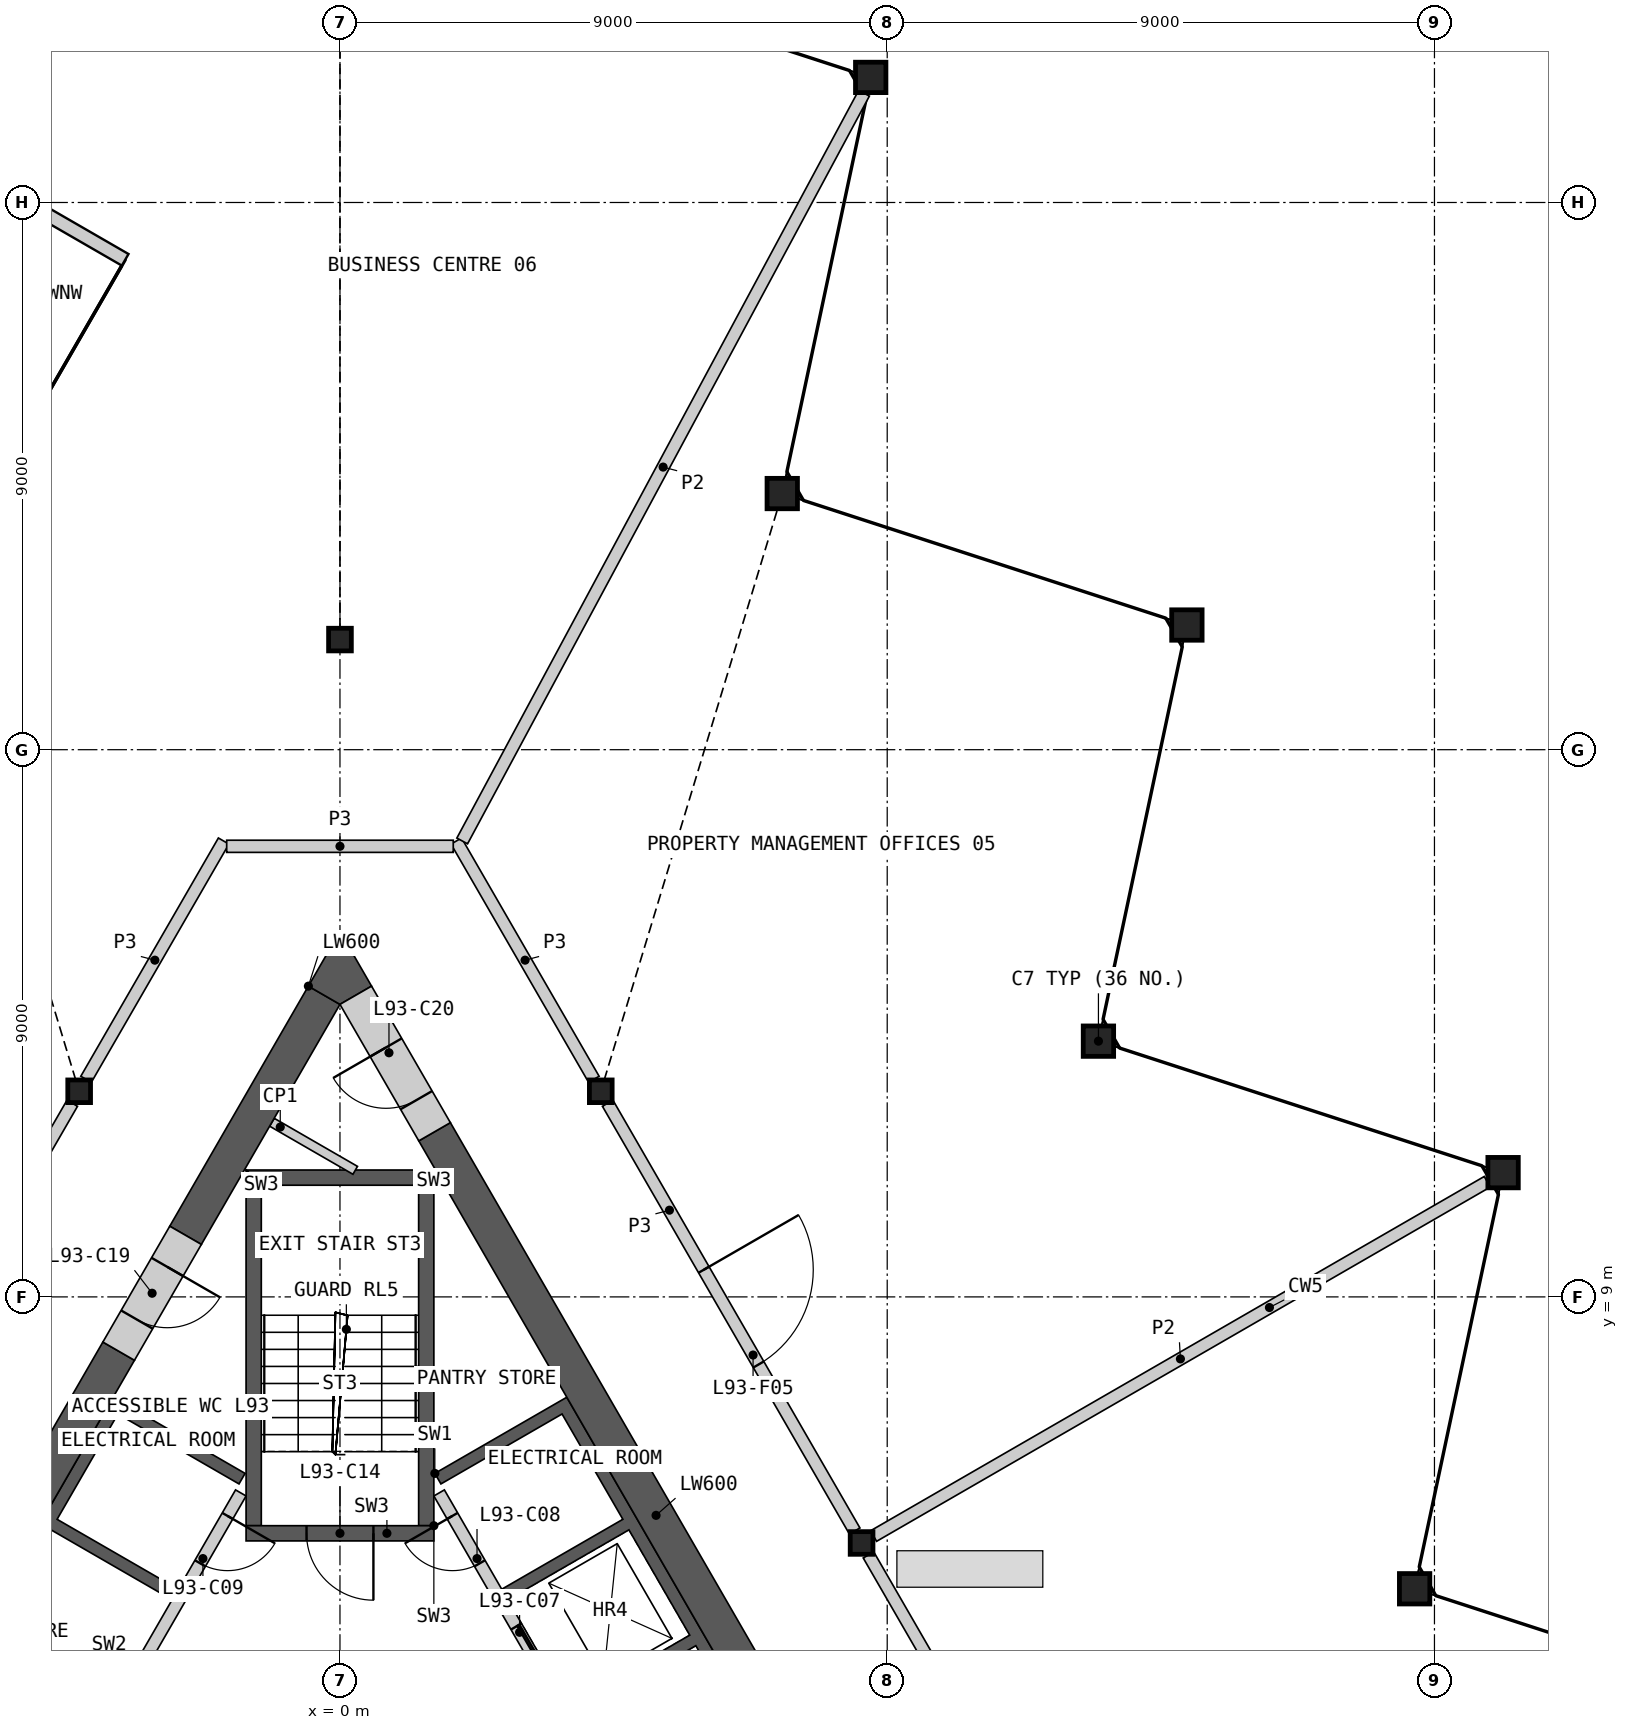
"""IFC4 building model, lengths in metres.
Left out: names, types, materials, properties, quantities, classifications, styles, units other than length and angle.
Written with IfcOpenShell. Run it as: python <this file> out.ifc"""

import sys

from ifc_helpers import new_model, si_unit, direction, frame, frame_2d, origin, origin_2d, place, context, subcontext, project, spatial, polyline, rectangle, hollow_rectangle, i_section, outline, extrude, element, fill, save


model = new_model("IFC4")
c1 = context("Model", 3, precision=1e-05, world=origin(), true_north=direction((0.0, 1.0)))
c2 = subcontext(c1, "Body", "Model", "MODEL_VIEW")
j1 = project(units=[si_unit("LENGTHUNIT", "METRE"), si_unit("PLANEANGLEUNIT", "RADIAN")], contexts=[c1])
p1 = place(None, origin())
s1 = spatial("IfcSite", under=j1, at=p1, CompositionType="ELEMENT")
p2 = place(p1, origin())
s2 = spatial("IfcBuilding", under=s1, at=p2, CompositionType="ELEMENT")
p3 = place(p2, frame((0.0, 0.0, 405.2)))
s3 = spatial("IfcBuildingStorey", under=s2, at=p3, CompositionType="ELEMENT", Elevation=405.2)
for number, where, z_axis, x_axis in (
    (1, (17.674, 4.199, 0.0), (0.0, 0.0, 1.0), (1.0, 0.0, 0.0)),
    (2, (19.129, 11.044, 0.0), (0.0, 0.0, 1.0), (1.0, 0.0, 0.0)),
    (3, (12.474, 13.206, 0.0), (0.0, 0.0, 1.0), (1.0, 0.0, 0.0)),
    (4, (13.929, 20.051, 0.0), (0.0, 0.0, 1.0), (1.0, 0.0, 0.0)),
    (5, (7.274, 22.213, 0.0), (0.0, 0.0, 1.0), (1.0, 0.0, 0.0)),
    (6, (8.729, 29.057, 0.0), (0.0, 0.0, 1.0), (1.0, 0.0, 0.0)),
):
    element("IfcColumn", number, at=place(p3, frame(where, z_axis=z_axis, x_axis=x_axis)), inside=s3, PredefinedType="COLUMN", context=c2, shape_type="SweptSolid", body=[
        extrude(hollow_rectangle(XDim=0.5, YDim=0.5, WallThickness=0.03, at=origin_2d()), origin(), (0.0, 0.0, 1.0), 10.0),
    ])
for number, where, z_axis, x_axis in (
    (7, (0.0, 19.811, 0.0), (0.0, 0.0, 1.0), (1.0, 0.0, 0.0)),
    (8, (-4.289, 12.382, 0.0), (0.0, 0.0, 1.0), (1.0, 0.0, 0.0)),
    (9, (8.578, 4.953, 0.0), (0.0, 0.0, 1.0), (1.0, 0.0, 0.0)),
    (10, (4.289, 12.382, 0.0), (0.0, 0.0, 1.0), (1.0, 0.0, 0.0)),
):
    element("IfcColumn", number, at=place(p3, frame(where, z_axis=z_axis, x_axis=x_axis)), inside=s3, PredefinedType="COLUMN", context=c2, shape_type="SweptSolid", body=[
        extrude(i_section(OverallWidth=0.374, OverallDepth=0.372, WebThickness=0.016, FlangeThickness=0.026, at=origin_2d()), origin(), (0.0, 0.0, 1.0), 10.0),
    ])
p4 = place(p3, frame((-8.435, 28.887, 0.0), z_axis=(0.0, 0.0, 1.0), x_axis=(0.866018233111, -0.500012419765, 0.0)))
e11 = element("IfcWall", 11, at=p4, inside=s3, PredefinedType="SOLIDWALL", context=c2, shape_type="SweptSolid", body=[
    extrude(rectangle(XDim=5.66, YDim=0.22, at=frame_2d((2.83, 0.0))), origin(), (0.0, 0.0, 1.0), 9.234),
])
p5 = place(p3, origin())
e12 = element("IfcWall", 12, at=p5, inside=s3, PredefinedType="SHEAR", context=c2, shape_type="SweptSolid", body=[
    extrude(outline(polyline([(1.561, 6.097), (3.731, 7.35), (8.231, -0.444), (6.061, -1.697), (5.96, -1.524), (7.952, -0.374), (6.952, 1.358), (4.96, 0.208), (4.861, 0.381), (6.852, 1.531), (5.852, 3.263), (3.861, 2.113), (3.76, 2.287), (5.752, 3.437), (4.752, 5.169), (2.76, 4.019), (2.66, 4.192), (4.652, 5.342), (3.652, 7.074), (1.66, 5.924), (1.561, 6.097)])), origin(), (0.0, 0.0, 1.0), 9.7),
])
p6 = place(p3, frame((5.817, -1.476, 0.0), z_axis=(0.0, 0.0, 1.0), x_axis=(-0.500002616675, 0.866023893041, 0.0)))
e13 = element("IfcWall", 13, at=p6, inside=s3, PredefinedType="SOLIDWALL", context=c2, shape_type="SweptSolid", body=[
    extrude(rectangle(XDim=8.373, YDim=0.2, at=frame_2d((4.187, 0.0))), origin(), (0.0, 0.0, 1.0), 9.7),
])
p7 = place(p6, frame((0.337, 0.0, 0.0)))
e14 = element("IfcOpeningElement", 14, at=p7, cuts=e13, PredefinedType="OPENING", context=c2, shape_type="SweptSolid", body=[
    extrude(rectangle(XDim=1.1, YDim=2.1, at=frame_2d((0.55, 1.05))), frame((0.0, 0.11, 0.0), z_axis=(0.0, -1.0, 0.0), x_axis=(1.0, 0.0, 0.0)), (0.0, 0.0, 1.0), 0.22),
])
p8 = place(p6, frame((2.537, 0.0, 0.0)))
e15 = element("IfcOpeningElement", 15, at=p8, cuts=e13, PredefinedType="OPENING", context=c2, shape_type="SweptSolid", body=[
    extrude(rectangle(XDim=1.1, YDim=2.1, at=frame_2d((0.55, 1.05))), frame((0.0, 0.11, 0.0), z_axis=(0.0, -1.0, 0.0), x_axis=(1.0, 0.0, 0.0)), (0.0, 0.0, 1.0), 0.22),
])
p9 = place(p6, frame((4.737, 0.0, 0.0)))
e16 = element("IfcOpeningElement", 16, at=p9, cuts=e13, PredefinedType="OPENING", context=c2, shape_type="SweptSolid", body=[
    extrude(rectangle(XDim=1.1, YDim=2.1, at=frame_2d((0.55, 1.05))), frame((0.0, 0.11, 0.0), z_axis=(0.0, -1.0, 0.0), x_axis=(1.0, 0.0, 0.0)), (0.0, 0.0, 1.0), 0.22),
])
p10 = place(p6, frame((7.037, 0.0, 0.0)))
e17 = element("IfcOpeningElement", 17, at=p10, cuts=e13, PredefinedType="OPENING", context=c2, shape_type="SweptSolid", body=[
    extrude(rectangle(XDim=0.9, YDim=2.1, at=frame_2d((0.45, 1.05))), frame((0.0, 0.11, 0.0), z_axis=(0.0, -1.0, 0.0), x_axis=(1.0, 0.0, 0.0)), (0.0, 0.0, 1.0), 0.22),
])
p11 = place(p3, origin())
e18 = element("IfcWall", 18, at=p11, inside=s3, PredefinedType="SHEAR", context=c2, shape_type="SweptSolid", body=[
    extrude(outline(polyline([(-4.96, 0.208), (-7.131, 1.461), (-3.731, 7.35), (-1.561, 6.097), (-1.66, 5.924), (-3.652, 7.074), (-4.652, 5.342), (-2.66, 4.192), (-2.76, 4.019), (-4.752, 5.169), (-6.852, 1.531), (-4.861, 0.381), (-4.96, 0.208)])), origin(), (0.0, 0.0, 1.0), 9.7),
])
p12 = place(p3, frame((-1.631, 5.776, 0.0), z_axis=(0.0, 0.0, 1.0), x_axis=(-0.499992876559, -0.866029516466, 0.0)))
e19 = element("IfcWall", 19, at=p12, inside=s3, PredefinedType="SOLIDWALL", context=c2, shape_type="SweptSolid", body=[
    extrude(rectangle(XDim=6.486, YDim=0.2, at=frame_2d((3.243, 0.0))), origin(), (0.0, 0.0, 1.0), 9.7),
])
p13 = place(p12, frame((0.437, 0.0, 0.0)))
e20 = element("IfcOpeningElement", 20, at=p13, cuts=e19, PredefinedType="OPENING", context=c2, shape_type="SweptSolid", body=[
    extrude(rectangle(XDim=0.9, YDim=2.1, at=frame_2d((0.45, 1.05))), frame((0.0, 0.11, 0.0), z_axis=(0.0, -1.0, 0.0), x_axis=(1.0, 0.0, 0.0)), (0.0, 0.0, 1.0), 0.22),
])
p14 = place(p12, frame((3.737, 0.0, 0.0)))
e21 = element("IfcOpeningElement", 21, at=p14, cuts=e19, PredefinedType="OPENING", context=c2, shape_type="SweptSolid", body=[
    extrude(rectangle(XDim=0.9, YDim=2.1, at=frame_2d((0.45, 1.05))), frame((0.0, 0.11, 0.0), z_axis=(0.0, -1.0, 0.0), x_axis=(1.0, 0.0, 0.0)), (0.0, 0.0, 1.0), 0.22),
])
p15 = place(p3, origin())
e22 = element("IfcWall", 22, at=p15, inside=s3, PredefinedType="SHEAR", context=c2, shape_type="SweptSolid", body=[
    extrude(outline(polyline([(1.544, 5.237), (1.544, 11.087), (1.294, 10.837), (1.294, 5.237), (1.544, 5.237)])), origin(), (0.0, 0.0, 1.0), 9.7),
])
p16 = place(p3, origin())
e23 = element("IfcWall", 23, at=p16, inside=s3, PredefinedType="SHEAR", context=c2, shape_type="SweptSolid", body=[
    extrude(outline(polyline([(1.544, 11.087), (-1.544, 11.087), (-1.294, 10.837), (1.294, 10.837), (1.544, 11.087)])), origin(), (0.0, 0.0, 1.0), 9.7),
])
p17 = place(p3, origin())
e24 = element("IfcWall", 24, at=p17, inside=s3, PredefinedType="SHEAR", context=c2, shape_type="SweptSolid", body=[
    extrude(outline(polyline([(-1.294, 10.837), (-1.544, 11.087), (-1.544, 5.237), (-1.294, 5.237), (-1.294, 10.837)])), origin(), (0.0, 0.0, 1.0), 9.7),
])
p18 = place(p3, frame((1.544, 5.112, 0.0), z_axis=(0.0, 0.0, 1.0), x_axis=(-1.0, 0.0, 0.0)))
e25 = element("IfcWall", 25, at=p18, inside=s3, PredefinedType="SHEAR", context=c2, shape_type="SweptSolid", body=[
    extrude(rectangle(XDim=3.088, YDim=0.25, at=frame_2d((1.544, 0.0))), origin(), (0.0, 0.0, 1.0), 9.7),
])
p19 = place(p18, frame((0.994, 0.0, 0.0)))
e26 = element("IfcOpeningElement", 26, at=p19, cuts=e25, PredefinedType="OPENING", context=c2, shape_type="SweptSolid", body=[
    extrude(rectangle(XDim=1.1, YDim=2.1, at=frame_2d((0.55, 1.05))), frame((0.0, 0.135, 0.0), z_axis=(0.0, -1.0, 0.0), x_axis=(1.0, 0.0, 0.0)), (0.0, 0.0, 1.0), 0.27),
])
p20 = place(p3, frame((-1.119, 11.873, 0.0), z_axis=(0.0, 0.0, 1.0), x_axis=(0.865992812752, -0.500056445075, 0.0)))
e27 = element("IfcWall", 27, at=p20, inside=s3, PredefinedType="PARTITIONING", context=c2, shape_type="SweptSolid", body=[
    extrude(rectangle(XDim=1.582, YDim=0.15, at=frame_2d((0.791, 0.0))), origin(), (0.0, 0.0, 1.0), 9.7),
])
p21 = place(p3, frame((8.841, -0.902, 0.0), z_axis=(0.0, 0.0, 1.0), x_axis=(-0.499995618375, 0.866027933502, 0.0)))
e28 = element("IfcWall", 28, at=p21, inside=s3, PredefinedType="SHEAR", context=c2, shape_type="SweptSolid", body=[
    extrude(rectangle(XDim=14.571, YDim=0.6, at=frame_2d((7.285, 0.0))), origin(), (0.0, 0.0, 1.0), 9.7),
])
p22 = place(p3, frame((-3.639, 8.107, 0.0), z_axis=(0.0, 0.0, 1.0), x_axis=(-0.49999180351, -0.866030135978, 0.0)))
e29 = element("IfcWall", 29, at=p22, inside=s3, PredefinedType="SHEAR", context=c2, shape_type="SweptSolid", body=[
    extrude(rectangle(XDim=7.401, YDim=0.6, at=frame_2d((3.701, 0.0))), origin(), (0.0, 0.0, 1.0), 9.7),
])
p23 = place(p3, frame((-0.26, 13.961, 0.0), z_axis=(0.0, 0.0, 1.0), x_axis=(-0.499980485389, -0.866036670257, 0.0)))
e30 = element("IfcWall", 30, at=p23, inside=s3, PredefinedType="SHEAR", context=c2, shape_type="SweptSolid", body=[
    extrude(rectangle(XDim=4.559, YDim=0.6, at=frame_2d((2.28, 0.0))), origin(), (0.0, 0.0, 1.0), 9.7),
])
p24 = place(p3, origin())
e31 = element("IfcWall", 31, at=p24, inside=s3, PredefinedType="SHEAR", context=c2, shape_type="SweptSolid", body=[
    extrude(outline(polyline([(-0.52, 14.111), (0.0, 15.011), (0.52, 14.111), (0.0, 13.811), (-0.52, 14.111)])), origin(), (0.0, 0.0, 1.0), 9.7),
])
p25 = place(p3, frame((-2.539, 10.013, 0.0), z_axis=(0.0, 0.0, 1.0), x_axis=(-0.50002983664, -0.866008176907, 0.0)))
e32 = element("IfcWall", 32, at=p25, inside=s3, PredefinedType="SHEAR", context=c2, shape_type="SweptSolid", body=[
    extrude(rectangle(XDim=2.2, YDim=0.6, at=frame_2d((1.1, 0.0))), origin(), (0.0, 0.0, 1.0), 9.7),
])
p26 = place(p25, frame((0.6, 0.0, 0.0)))
e33 = element("IfcOpeningElement", 33, at=p26, cuts=e32, PredefinedType="OPENING", context=c2, shape_type="SweptSolid", body=[
    extrude(rectangle(XDim=1.0, YDim=2.1, at=frame_2d((0.5, 1.05))), frame((0.0, 0.31, 0.0), z_axis=(0.0, -1.0, 0.0), x_axis=(1.0, 0.0, 0.0)), (0.0, 0.0, 1.0), 0.62),
])
p27 = place(p3, frame((1.556, 11.716, 0.0), z_axis=(0.0, 0.0, 1.0), x_axis=(-0.500018667571, 0.866014625789, 0.0)))
e34 = element("IfcWall", 34, at=p27, inside=s3, PredefinedType="SHEAR", context=c2, shape_type="SweptSolid", body=[
    extrude(rectangle(XDim=2.592, YDim=0.6, at=frame_2d((1.296, 0.0))), origin(), (0.0, 0.0, 1.0), 9.7),
])
p28 = place(p27, frame((0.6, 0.0, 0.0)))
e35 = element("IfcOpeningElement", 35, at=p28, cuts=e34, PredefinedType="OPENING", context=c2, shape_type="SweptSolid", body=[
    extrude(rectangle(XDim=1.0, YDim=2.1, at=frame_2d((0.5, 1.05))), frame((0.0, 0.31, 0.0), z_axis=(0.0, -1.0, 0.0), x_axis=(1.0, 0.0, 0.0)), (0.0, 0.0, 1.0), 0.62),
])
p29 = place(p3, frame((4.403, 12.185, 0.0), z_axis=(0.0, 0.0, 1.0), x_axis=(0.499992155518, -0.866029932751, 0.0)))
e36 = element("IfcWall", 36, at=p29, inside=s3, PredefinedType="PARTITIONING", context=c2, shape_type="SweptSolid", body=[
    extrude(rectangle(XDim=8.123, YDim=0.2, at=frame_2d((4.062, 0.0))), origin(), (0.0, 0.0, 1.0), 9.7),
])
p30 = place(p29, frame((3.162, 0.0, 0.0)))
e37 = element("IfcOpeningElement", 37, at=p30, cuts=e36, PredefinedType="OPENING", context=c2, shape_type="SweptSolid", body=[
    extrude(rectangle(XDim=1.8, YDim=2.1, at=frame_2d((0.9, 1.05))), frame((0.0, 0.11, 0.0), z_axis=(0.0, -1.0, 0.0), x_axis=(1.0, 0.0, 0.0)), (0.0, 0.0, 1.0), 0.22),
])
p31 = place(p3, frame((-8.465, 5.15, 0.0), z_axis=(0.0, 0.0, 1.0), x_axis=(0.499992155518, 0.866029932751, 0.0)))
e38 = element("IfcWall", 38, at=p31, inside=s3, PredefinedType="PARTITIONING", context=c2, shape_type="SweptSolid", body=[
    extrude(rectangle(XDim=8.123, YDim=0.2, at=frame_2d((4.062, 0.0))), origin(), (0.0, 0.0, 1.0), 9.7),
])
p32 = place(p31, frame((3.162, 0.0, 0.0)))
e39 = element("IfcOpeningElement", 39, at=p32, cuts=e38, PredefinedType="OPENING", context=c2, shape_type="SweptSolid", body=[
    extrude(rectangle(XDim=1.8, YDim=2.1, at=frame_2d((0.9, 1.05))), frame((0.0, 0.11, 0.0), z_axis=(0.0, -1.0, 0.0), x_axis=(1.0, 0.0, 0.0)), (0.0, 0.0, 1.0), 0.22),
])
p33 = place(p3, frame((8.692, 4.756, 0.0), z_axis=(0.0, 0.0, 1.0), x_axis=(0.500001682468, -0.866024432409, 0.0)))
e40 = element("IfcWall", 40, at=p33, inside=s3, PredefinedType="PARTITIONING", context=c2, shape_type="SweptSolid", body=[
    extrude(rectangle(XDim=8.124, YDim=0.2, at=frame_2d((4.062, 0.0))), origin(), (0.0, 0.0, 1.0), 9.7),
])
p34 = place(p33, frame((3.162, 0.0, 0.0)))
e41 = element("IfcOpeningElement", 41, at=p34, cuts=e40, PredefinedType="OPENING", context=c2, shape_type="SweptSolid", body=[
    extrude(rectangle(XDim=1.8, YDim=2.1, at=frame_2d((0.9, 1.05))), frame((0.0, 0.11, 0.0), z_axis=(0.0, -1.0, 0.0), x_axis=(1.0, 0.0, 0.0)), (0.0, 0.0, 1.0), 0.22),
])
for number, where, z_axis, x_axis in (
    (42, (1.913, 16.498, 0.0), (0.0, 0.0, 1.0), (0.5, -0.866, 0.0)),
    (43, (-4.176, 12.579, 0.0), (0.0, 0.0, 1.0), (0.5, 0.866, 0.0)),
):
    element("IfcWall", number, at=place(p3, frame(where, z_axis=z_axis, x_axis=x_axis)), inside=s3, PredefinedType="PARTITIONING", context=c2, shape_type="SweptSolid", body=[
        extrude(rectangle(XDim=4.525, YDim=0.2, at=frame_2d((2.263, 0.0))), origin(), (0.0, 0.0, 1.0), 9.7),
    ])
p35 = place(p3, frame((-1.863, 16.411, 0.0), z_axis=(0.0, 0.0, 1.0), x_axis=(1.0, 0.0, 0.0)))
e44 = element("IfcWall", 44, at=p35, inside=s3, PredefinedType="PARTITIONING", context=c2, shape_type="SweptSolid", body=[
    extrude(rectangle(XDim=3.726, YDim=0.2, at=frame_2d((1.863, 0.0))), origin(), (0.0, 0.0, 1.0), 9.7),
])
p36 = place(p3, frame((2.01, 16.499, 0.0), z_axis=(0.0, 0.0, 1.0), x_axis=(0.473341524228, 0.880878993643, 0.0)))
e45 = element("IfcWall", 45, at=p36, inside=s3, PredefinedType="PARTITIONING", context=c2, shape_type="SweptSolid", body=[
    extrude(rectangle(XDim=13.961, YDim=0.2, at=frame_2d((6.98, 0.0))), origin(), (0.0, 0.0, 1.0), 8.93),
])
p37 = place(p3, frame((8.775, 5.066, 0.0), z_axis=(0.0, 0.0, 1.0), x_axis=(0.866023724155, 0.500002909193, 0.0)))
e46 = element("IfcWall", 46, at=p37, inside=s3, PredefinedType="PARTITIONING", context=c2, shape_type="SweptSolid", body=[
    extrude(rectangle(XDim=11.655, YDim=0.2, at=frame_2d((5.827, 0.0))), origin(), (0.0, 0.0, 1.0), 8.93),
])
p38 = place(p9, origin())
e47 = element("IfcDoor", 47, at=p38, inside=s3, OperationType="SLIDING_TO_LEFT", PredefinedType="DOOR", context=c2, shape_type="SweptSolid", body=[
    extrude(rectangle(XDim=1.1, YDim=2.1, at=frame_2d((0.55, 1.05))), frame((0.0, 0.025, 0.0), z_axis=(0.0, -1.0, 0.0), x_axis=(1.0, 0.0, 0.0)), (0.0, 0.0, 1.0), 0.05),
])
fill(e16, e47)
p39 = place(p10, origin())
e48 = element("IfcDoor", 48, at=p39, inside=s3, OperationType="SINGLE_SWING_RIGHT", PredefinedType="DOOR", context=c2, shape_type="SweptSolid", body=[
    extrude(rectangle(XDim=0.9, YDim=2.1, at=frame_2d((0.45, 1.05))), frame((0.0, 0.025, 0.0), z_axis=(0.0, -1.0, 0.0), x_axis=(1.0, 0.0, 0.0)), (0.0, 0.0, 1.0), 0.05),
])
fill(e17, e48)
p40 = place(p13, origin())
e49 = element("IfcDoor", 49, at=p40, inside=s3, OperationType="SINGLE_SWING_LEFT", PredefinedType="DOOR", context=c2, shape_type="SweptSolid", body=[
    extrude(rectangle(XDim=0.9, YDim=2.1, at=frame_2d((0.45, 1.05))), frame((0.0, 0.025, 0.0), z_axis=(0.0, -1.0, 0.0), x_axis=(1.0, 0.0, 0.0)), (0.0, 0.0, 1.0), 0.05),
])
fill(e20, e49)
p41 = place(p19, origin())
e50 = element("IfcDoor", 50, at=p41, inside=s3, OperationType="SINGLE_SWING_LEFT", PredefinedType="DOOR", context=c2, shape_type="SweptSolid", body=[
    extrude(rectangle(XDim=1.1, YDim=2.1, at=frame_2d((0.55, 1.05))), frame((0.0, 0.025, 0.0), z_axis=(0.0, -1.0, 0.0), x_axis=(1.0, 0.0, 0.0)), (0.0, 0.0, 1.0), 0.05),
])
fill(e26, e50)
p42 = place(p26, origin())
e51 = element("IfcDoor", 51, at=p42, inside=s3, OperationType="SINGLE_SWING_LEFT", PredefinedType="DOOR", context=c2, shape_type="SweptSolid", body=[
    extrude(rectangle(XDim=1.0, YDim=2.1, at=frame_2d((0.5, 1.05))), frame((0.0, 0.055, 0.0), z_axis=(0.0, -1.0, 0.0), x_axis=(1.0, 0.0, 0.0)), (0.0, 0.0, 1.0), 0.05),
])
fill(e33, e51)
p43 = place(p28, origin())
e52 = element("IfcDoor", 52, at=p43, inside=s3, OperationType="SINGLE_SWING_RIGHT", PredefinedType="DOOR", context=c2, shape_type="SweptSolid", body=[
    extrude(rectangle(XDim=1.0, YDim=2.1, at=frame_2d((0.5, 1.05))), frame((0.0, 0.055, 0.0), z_axis=(0.0, -1.0, 0.0), x_axis=(1.0, 0.0, 0.0)), (0.0, 0.0, 1.0), 0.05),
])
fill(e35, e52)
p44 = place(p30, origin())
e53 = element("IfcDoor", 53, at=p44, inside=s3, OperationType="DOUBLE_DOOR_SINGLE_SWING", PredefinedType="DOOR", context=c2, shape_type="SweptSolid", body=[
    extrude(rectangle(XDim=1.8, YDim=2.1, at=frame_2d((0.9, 1.05))), frame((0.0, 0.025, 0.0), z_axis=(0.0, -1.0, 0.0), x_axis=(1.0, 0.0, 0.0)), (0.0, 0.0, 1.0), 0.05),
])
fill(e37, e53)
save(model, sys.argv[1])
